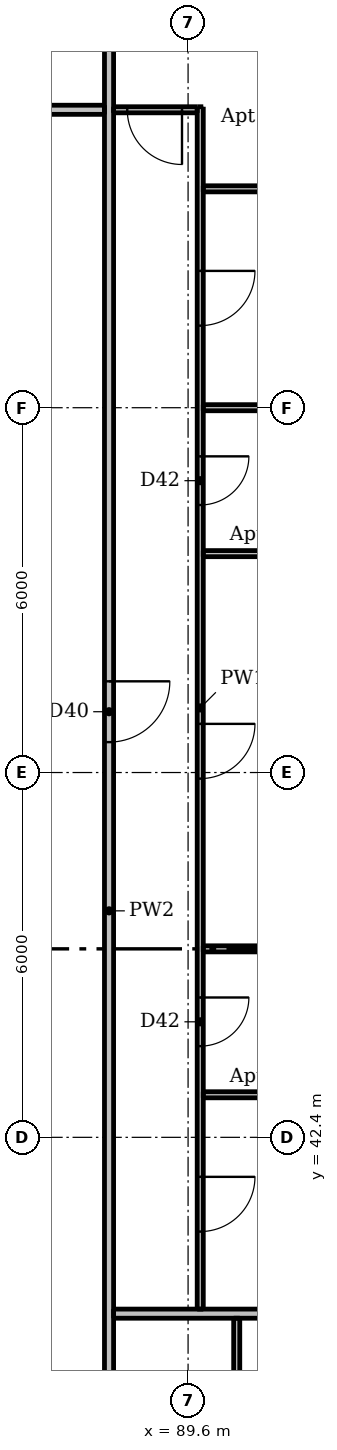
"""IFC4 building model, lengths in metres.
Left out: names, types, materials, properties, quantities, classifications, styles, units other than length and angle.
Written with IfcOpenShell. Run it as: python <this file> out.ifc"""

import sys

from ifc_helpers import new_model, si_unit, direction, frame, frame_2d, origin, place, context, subcontext, project, spatial, rectangle, extrude, element, fill, save


model = new_model("IFC4")
c1 = context("Model", 3, precision=1e-05, world=origin(), true_north=direction((0.0, 1.0)))
c2 = subcontext(c1, "Body", "Model", "MODEL_VIEW")
j1 = project(units=[si_unit("LENGTHUNIT", "METRE"), si_unit("PLANEANGLEUNIT", "RADIAN")], contexts=[c1])
p1 = place(None, origin())
s1 = spatial("IfcSite", under=j1, at=p1, CompositionType="ELEMENT")
p2 = place(p1, origin())
s2 = spatial("IfcBuilding", under=s1, at=p2, CompositionType="ELEMENT")
p3 = place(p2, frame((0.0, 0.0, 133.9)))
s3 = spatial("IfcBuildingStorey", under=s2, at=p3, CompositionType="ELEMENT", Elevation=133.9)
p4 = place(p3, frame((89.8, 59.35, 0.0), z_axis=(0.0, 0.0, 1.0), x_axis=(0.0, -1.0, 0.0)))
e1 = element("IfcWall", 1, at=p4, inside=s3, PredefinedType="PARTITIONING", context=c2, shape_type="SweptSolid", body=[
    extrude(rectangle(XDim=19.775, YDim=0.1, at=frame_2d((9.888, 0.0))), origin(), (0.0, 0.0, 1.0), 3.05),
])
p5 = place(p4, frame((2.7, 0.0, 0.0)))
e2 = element("IfcOpeningElement", 2, at=p5, cuts=e1, PredefinedType="OPENING", context=c2, shape_type="SweptSolid", body=[
    extrude(rectangle(XDim=0.9, YDim=2.1, at=frame_2d((0.45, 1.05))), frame((0.0, 0.06, 0.0), z_axis=(0.0, -1.0, 0.0), x_axis=(1.0, 0.0, 0.0)), (0.0, 0.0, 1.0), 0.12),
])
p6 = place(p4, frame((17.6, 0.0, 0.0)))
e3 = element("IfcOpeningElement", 3, at=p6, cuts=e1, PredefinedType="OPENING", context=c2, shape_type="SweptSolid", body=[
    extrude(rectangle(XDim=0.9, YDim=2.1, at=frame_2d((0.45, 1.05))), frame((0.0, 0.06, 0.0), z_axis=(0.0, -1.0, 0.0), x_axis=(1.0, 0.0, 0.0)), (0.0, 0.0, 1.0), 0.12),
])
p7 = place(p4, frame((10.15, 0.0, 0.0)))
e4 = element("IfcOpeningElement", 4, at=p7, cuts=e1, PredefinedType="OPENING", context=c2, shape_type="SweptSolid", body=[
    extrude(rectangle(XDim=0.9, YDim=2.1, at=frame_2d((0.45, 1.05))), frame((0.0, 0.06, 0.0), z_axis=(0.0, -1.0, 0.0), x_axis=(1.0, 0.0, 0.0)), (0.0, 0.0, 1.0), 0.12),
])
p8 = place(p4, frame((14.65, 0.0, 0.0)))
e5 = element("IfcOpeningElement", 5, at=p8, cuts=e1, PredefinedType="OPENING", context=c2, shape_type="SweptSolid", body=[
    extrude(rectangle(XDim=0.8, YDim=2.1, at=frame_2d((0.4, 1.05))), frame((0.0, 0.06, 0.0), z_axis=(0.0, -1.0, 0.0), x_axis=(1.0, 0.0, 0.0)), (0.0, 0.0, 1.0), 0.12),
])
p9 = place(p4, frame((5.75, 0.0, 0.0)))
e6 = element("IfcOpeningElement", 6, at=p9, cuts=e1, PredefinedType="OPENING", context=c2, shape_type="SweptSolid", body=[
    extrude(rectangle(XDim=0.8, YDim=2.1, at=frame_2d((0.4, 1.05))), frame((0.0, 0.06, 0.0), z_axis=(0.0, -1.0, 0.0), x_axis=(1.0, 0.0, 0.0)), (0.0, 0.0, 1.0), 0.12),
])
p10 = place(p3, frame((90.4, 33.45, 0.0), z_axis=(0.0, 0.0, 1.0), x_axis=(0.0, 1.0, 0.0)))
e7 = element("IfcWall", 7, at=p10, inside=s3, PredefinedType="PARTITIONING", context=c2, shape_type="SweptSolid", body=[
    extrude(rectangle(XDim=5.975, YDim=0.1, at=frame_2d((2.988, 0.0))), origin(), (0.0, 0.0, 1.0), 3.05),
])
p11 = place(p10, frame((3.8, 0.0, 0.0)))
e8 = element("IfcOpeningElement", 8, at=p11, cuts=e7, PredefinedType="OPENING", context=c2, shape_type="SweptSolid", body=[
    extrude(rectangle(XDim=0.8, YDim=2.1, at=frame_2d((0.4, 1.05))), frame((0.0, 0.06, 0.0), z_axis=(0.0, -1.0, 0.0), x_axis=(1.0, 0.0, 0.0)), (0.0, 0.0, 1.0), 0.12),
])
p12 = place(p3, frame((89.75, 59.3, 0.0), z_axis=(0.0, 0.0, 1.0), x_axis=(-1.0, 0.0, 0.0)))
e9 = element("IfcWall", 9, at=p12, inside=s3, PredefinedType="PARTITIONING", context=c2, shape_type="SweptSolid", body=[
    extrude(rectangle(XDim=1.375, YDim=0.1, at=frame_2d((0.688, 0.0))), origin(), (0.0, 0.0, 1.0), 3.05),
])
p13 = place(p12, frame((0.25, 0.0, 0.0)))
e10 = element("IfcOpeningElement", 10, at=p13, cuts=e9, PredefinedType="OPENING", context=c2, shape_type="SweptSolid", body=[
    extrude(rectangle(XDim=0.9, YDim=2.1, at=frame_2d((0.45, 1.05))), frame((0.0, 0.06, 0.0), z_axis=(0.0, -1.0, 0.0), x_axis=(1.0, 0.0, 0.0)), (0.0, 0.0, 1.0), 0.12),
])
p14 = place(p3, frame((89.85, 58.0, 0.0), z_axis=(0.0, 0.0, 1.0), x_axis=(1.0, 0.0, 0.0)))
e11 = element("IfcWall", 11, at=p14, inside=s3, PredefinedType="PARTITIONING", context=c2, shape_type="SweptSolid", body=[
    extrude(rectangle(XDim=3.5, YDim=0.1, at=frame_2d((1.75, 0.0))), origin(), (0.0, 0.0, 1.0), 3.05),
])
p15 = place(p3, frame((89.85, 54.4, 0.0), z_axis=(0.0, 0.0, 1.0), x_axis=(1.0, 0.0, 0.0)))
e12 = element("IfcWall", 12, at=p15, inside=s3, PredefinedType="PARTITIONING", context=c2, shape_type="SweptSolid", body=[
    extrude(rectangle(XDim=7.65, YDim=0.1, at=frame_2d((3.825, 0.0))), origin(), (0.0, 0.0, 1.0), 2.516),
])
p16 = place(p3, frame((89.85, 52.0, 0.0), z_axis=(0.0, 0.0, 1.0), x_axis=(1.0, 0.0, 0.0)))
e13 = element("IfcWall", 13, at=p16, inside=s3, PredefinedType="PARTITIONING", context=c2, shape_type="SweptSolid", body=[
    extrude(rectangle(XDim=3.5, YDim=0.1, at=frame_2d((1.75, 0.0))), origin(), (0.0, 0.0, 1.0), 3.05),
])
p17 = place(p3, frame((89.85, 45.5, 0.0), z_axis=(0.0, 0.0, 1.0), x_axis=(1.0, 0.0, 0.0)))
e14 = element("IfcWall", 14, at=p17, inside=s3, PredefinedType="PARTITIONING", context=c2, shape_type="SweptSolid", body=[
    extrude(rectangle(XDim=6.15, YDim=0.1, at=frame_2d((3.075, 0.0))), origin(), (0.0, 0.0, 1.0), 3.05),
])
p18 = place(p3, frame((89.85, 43.1, 0.0), z_axis=(0.0, 0.0, 1.0), x_axis=(1.0, 0.0, 0.0)))
e15 = element("IfcWall", 15, at=p18, inside=s3, PredefinedType="PARTITIONING", context=c2, shape_type="SweptSolid", body=[
    extrude(rectangle(XDim=3.5, YDim=0.1, at=frame_2d((1.75, 0.0))), origin(), (0.0, 0.0, 1.0), 3.05),
])
p19 = place(p3, frame((88.3, 60.475, 0.0), z_axis=(0.0, 0.0, 1.0), x_axis=(0.0, -1.0, 0.0)))
e16 = element("IfcWall", 16, at=p19, inside=s3, PredefinedType="PARTITIONING", context=c2, shape_type="SweptSolid", body=[
    extrude(rectangle(XDim=28.7, YDim=0.15, at=frame_2d((14.35, 0.0))), origin(), (0.0, 0.0, 1.0), 3.05),
])
p20 = place(p19, frame((27.425, 0.0, 0.0)))
e17 = element("IfcOpeningElement", 17, at=p20, cuts=e16, PredefinedType="OPENING", context=c2, shape_type="SweptSolid", body=[
    extrude(rectangle(XDim=1.0, YDim=2.1, at=frame_2d((0.5, 1.05))), frame((0.0, 0.085, 0.0), z_axis=(0.0, -1.0, 0.0), x_axis=(1.0, 0.0, 0.0)), (0.0, 0.0, 1.0), 0.17),
])
p21 = place(p19, frame((10.575, 0.0, 0.0)))
e18 = element("IfcOpeningElement", 18, at=p21, cuts=e16, PredefinedType="OPENING", context=c2, shape_type="SweptSolid", body=[
    extrude(rectangle(XDim=1.0, YDim=2.1, at=frame_2d((0.5, 1.05))), frame((0.0, 0.085, 0.0), z_axis=(0.0, -1.0, 0.0), x_axis=(1.0, 0.0, 0.0)), (0.0, 0.0, 1.0), 0.17),
])
p22 = place(p3, frame((59.675, 59.3, 0.0), z_axis=(0.0, 0.0, 1.0), x_axis=(1.0, 0.0, 0.0)))
e19 = element("IfcWall", 19, at=p22, inside=s3, PredefinedType="PARTITIONING", context=c2, shape_type="SweptSolid", body=[
    extrude(rectangle(XDim=28.55, YDim=0.15, at=frame_2d((14.275, 0.0))), origin(), (0.0, 0.0, 1.0), 3.05),
])
p23 = place(p22, frame((8.975, 0.0, 0.0)))
e20 = element("IfcOpeningElement", 20, at=p23, cuts=e19, PredefinedType="OPENING", context=c2, shape_type="SweptSolid", body=[
    extrude(rectangle(XDim=1.0, YDim=2.1, at=frame_2d((0.5, 1.05))), frame((0.0, 0.085, 0.0), z_axis=(0.0, -1.0, 0.0), x_axis=(1.0, 0.0, 0.0)), (0.0, 0.0, 1.0), 0.17),
])
p24 = place(p22, frame((25.775, 0.0, 0.0)))
e21 = element("IfcOpeningElement", 21, at=p24, cuts=e19, PredefinedType="OPENING", context=c2, shape_type="SweptSolid", body=[
    extrude(rectangle(XDim=1.0, YDim=2.1, at=frame_2d((0.5, 1.05))), frame((0.0, 0.085, 0.0), z_axis=(0.0, -1.0, 0.0), x_axis=(1.0, 0.0, 0.0)), (0.0, 0.0, 1.0), 0.17),
])
p25 = place(p3, frame((88.375, 39.5, 0.0), z_axis=(0.0, 0.0, 1.0), x_axis=(1.0, 0.0, 0.0)))
e22 = element("IfcWall", 22, at=p25, inside=s3, PredefinedType="PARTITIONING", context=c2, shape_type="SweptSolid", body=[
    extrude(rectangle(XDim=7.625, YDim=0.15, at=frame_2d((3.812, 0.0))), origin(), (0.0, 0.0, 1.0), 3.05),
])
p26 = place(p21, origin())
e23 = element("IfcDoor", 23, at=p26, inside=s3, OperationType="SINGLE_SWING_LEFT", PredefinedType="DOOR", context=c2, shape_type="SweptSolid", body=[
    extrude(rectangle(XDim=1.0, YDim=2.1, at=frame_2d((0.5, 1.05))), frame((0.0, 0.025, 0.0), z_axis=(0.0, -1.0, 0.0), x_axis=(1.0, 0.0, 0.0)), (0.0, 0.0, 1.0), 0.05),
])
fill(e18, e23)
p27 = place(p5, origin())
e24 = element("IfcDoor", 24, at=p27, inside=s3, OperationType="SINGLE_SWING_LEFT", PredefinedType="DOOR", context=c2, shape_type="SweptSolid", body=[
    extrude(rectangle(XDim=0.9, YDim=2.1, at=frame_2d((0.45, 1.05))), frame((0.0, 0.025, 0.0), z_axis=(0.0, -1.0, 0.0), x_axis=(1.0, 0.0, 0.0)), (0.0, 0.0, 1.0), 0.05),
])
fill(e2, e24)
p28 = place(p13, origin())
e25 = element("IfcDoor", 25, at=p28, inside=s3, OperationType="SINGLE_SWING_LEFT", PredefinedType="DOOR", context=c2, shape_type="SweptSolid", body=[
    extrude(rectangle(XDim=0.9, YDim=2.1, at=frame_2d((0.45, 1.05))), frame((0.0, 0.025, 0.0), z_axis=(0.0, -1.0, 0.0), x_axis=(1.0, 0.0, 0.0)), (0.0, 0.0, 1.0), 0.05),
])
fill(e10, e25)
p29 = place(p6, origin())
e26 = element("IfcDoor", 26, at=p29, inside=s3, OperationType="SINGLE_SWING_LEFT", PredefinedType="DOOR", context=c2, shape_type="SweptSolid", body=[
    extrude(rectangle(XDim=0.9, YDim=2.1, at=frame_2d((0.45, 1.05))), frame((0.0, 0.025, 0.0), z_axis=(0.0, -1.0, 0.0), x_axis=(1.0, 0.0, 0.0)), (0.0, 0.0, 1.0), 0.05),
])
fill(e3, e26)
p30 = place(p7, origin())
e27 = element("IfcDoor", 27, at=p30, inside=s3, OperationType="SINGLE_SWING_LEFT", PredefinedType="DOOR", context=c2, shape_type="SweptSolid", body=[
    extrude(rectangle(XDim=0.9, YDim=2.1, at=frame_2d((0.45, 1.05))), frame((0.0, 0.025, 0.0), z_axis=(0.0, -1.0, 0.0), x_axis=(1.0, 0.0, 0.0)), (0.0, 0.0, 1.0), 0.05),
])
fill(e4, e27)
p31 = place(p8, origin())
e28 = element("IfcDoor", 28, at=p31, inside=s3, OperationType="SINGLE_SWING_LEFT", PredefinedType="DOOR", context=c2, shape_type="SweptSolid", body=[
    extrude(rectangle(XDim=0.8, YDim=2.1, at=frame_2d((0.4, 1.05))), frame((0.0, 0.025, 0.0), z_axis=(0.0, -1.0, 0.0), x_axis=(1.0, 0.0, 0.0)), (0.0, 0.0, 1.0), 0.05),
])
fill(e5, e28)
p32 = place(p9, origin())
e29 = element("IfcDoor", 29, at=p32, inside=s3, OperationType="SINGLE_SWING_LEFT", PredefinedType="DOOR", context=c2, shape_type="SweptSolid", body=[
    extrude(rectangle(XDim=0.8, YDim=2.1, at=frame_2d((0.4, 1.05))), frame((0.0, 0.025, 0.0), z_axis=(0.0, -1.0, 0.0), x_axis=(1.0, 0.0, 0.0)), (0.0, 0.0, 1.0), 0.05),
])
fill(e6, e29)
save(model, sys.argv[1])
